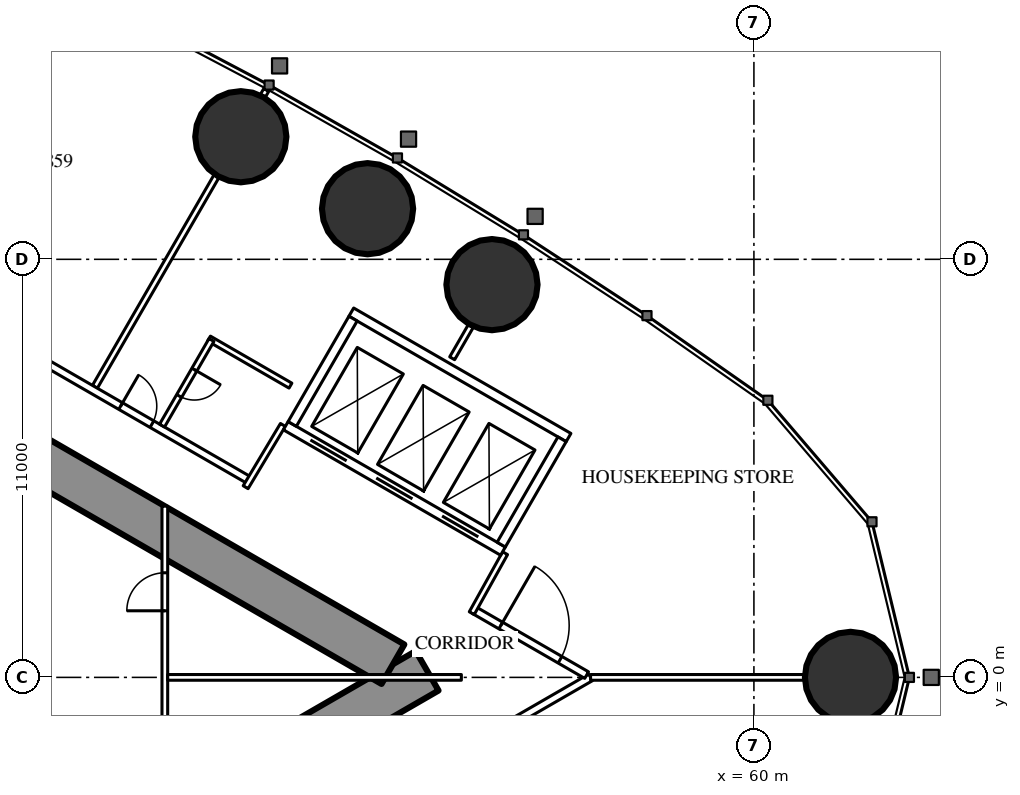
"""IFC4 building model, lengths in metres.
Left out: names, types, materials, properties, quantities, classifications, styles, units other than length and angle.
Written with IfcOpenShell. Run it as: python <this file> out.ifc"""

import sys

from ifc_helpers import new_model, si_unit, direction, frame, frame_2d, origin, origin_2d, place, context, subcontext, project, spatial, rectangle, circle, extrude, element, fill, save


model = new_model("IFC4")
c1 = context("Model", 3, precision=1e-05, world=origin(), true_north=direction((0.0, 1.0)))
c2 = subcontext(c1, "Body", "Model", "MODEL_VIEW")
j1 = project(units=[si_unit("LENGTHUNIT", "METRE"), si_unit("PLANEANGLEUNIT", "RADIAN")], contexts=[c1])
p1 = place(None, origin())
s1 = spatial("IfcSite", under=j1, at=p1, CompositionType="ELEMENT")
p2 = place(p1, origin())
s2 = spatial("IfcBuilding", under=s1, at=p2, CompositionType="ELEMENT")
p3 = place(p2, frame((0.0, 0.0, 218.9)))
s3 = spatial("IfcBuildingStorey", under=s2, at=p3, CompositionType="ELEMENT", Elevation=218.9)
for number, where, z_axis, x_axis in (
    (1, (62.542, 0.0, 0.0), (0.0, 0.0, 1.0), (1.0, 0.0, 0.0)),
    (2, (53.108, 10.334, 0.0), (0.0, 0.0, 1.0), (1.0, 0.0, 0.0)),
    (3, (49.834, 12.332, 0.0), (0.0, 0.0, 1.0), (1.0, 0.0, 0.0)),
    (4, (46.499, 14.226, 0.0), (0.0, 0.0, 1.0), (1.0, 0.0, 0.0)),
):
    element("IfcColumn", number, at=place(p3, frame(where, z_axis=z_axis, x_axis=x_axis)), inside=s3, PredefinedType="COLUMN", context=c2, shape_type="SweptSolid", body=[
        extrude(circle(Radius=1.2, at=origin_2d()), origin(), (0.0, 0.0, 1.0), 3.6),
    ])
p4 = place(p3, frame((27.2, -13.8, 0.0), z_axis=(0.0, 0.0, 1.0), x_axis=(0.866027159892, 0.499996958321, 0.0)))
e5 = element("IfcWall", 5, at=p4, inside=s3, PredefinedType="SHEAR", context=c2, shape_type="SweptSolid", body=[
    extrude(rectangle(XDim=27.947, YDim=1.2, at=frame_2d((13.973, 0.0))), origin(), (0.0, 0.0, 1.0), 3.6),
])
p5 = place(p4, frame((4.6, 0.0, 0.0)))
e6 = element("IfcOpeningElement", 6, at=p5, cuts=e5, PredefinedType="OPENING", context=c2, shape_type="SweptSolid", body=[
    extrude(rectangle(XDim=1.0, YDim=2.2, at=frame_2d((0.5, 1.1))), frame((0.0, 0.61, 0.0), z_axis=(0.0, -1.0, 0.0), x_axis=(1.0, 0.0, 0.0)), (0.0, 0.0, 1.0), 1.22),
])
p6 = place(p4, frame((13.395, 0.0, 0.0)))
e7 = element("IfcOpeningElement", 7, at=p6, cuts=e5, PredefinedType="OPENING", context=c2, shape_type="SweptSolid", body=[
    extrude(rectangle(XDim=1.8, YDim=2.2, at=frame_2d((0.9, 1.1))), frame((0.0, 0.61, 0.0), z_axis=(0.0, -1.0, 0.0), x_axis=(1.0, 0.0, 0.0)), (0.0, 0.0, 1.0), 1.22),
])
p7 = place(p3, frame((27.2, 13.8, 0.0), z_axis=(0.0, 0.0, 1.0), x_axis=(0.866024515034, -0.500001539357, 0.0)))
e8 = element("IfcWall", 8, at=p7, inside=s3, PredefinedType="SHEAR", context=c2, shape_type="SweptSolid", body=[
    extrude(rectangle(XDim=26.907, YDim=1.2, at=frame_2d((13.454, 0.0))), origin(), (0.0, 0.0, 1.0), 3.6),
])
p8 = place(p7, frame((4.6, 0.0, 0.0)))
e9 = element("IfcOpeningElement", 9, at=p8, cuts=e8, PredefinedType="OPENING", context=c2, shape_type="SweptSolid", body=[
    extrude(rectangle(XDim=1.0, YDim=2.2, at=frame_2d((0.5, 1.1))), frame((0.0, 0.61, 0.0), z_axis=(0.0, -1.0, 0.0), x_axis=(1.0, 0.0, 0.0)), (0.0, 0.0, 1.0), 1.22),
])
p9 = place(p7, frame((13.395, 0.0, 0.0)))
e10 = element("IfcOpeningElement", 10, at=p9, cuts=e8, PredefinedType="OPENING", context=c2, shape_type="SweptSolid", body=[
    extrude(rectangle(XDim=1.8, YDim=2.2, at=frame_2d((0.9, 1.1))), frame((0.0, 0.61, 0.0), z_axis=(0.0, -1.0, 0.0), x_axis=(1.0, 0.0, 0.0)), (0.0, 0.0, 1.0), 1.22),
])
p10 = place(p3, frame((28.959, -15.44, 0.0), z_axis=(0.0, 0.0, 1.0), x_axis=(0.866025227435, 0.500000305447, 0.0)))
e11 = element("IfcWall", 11, at=p10, inside=s3, PredefinedType="PARTITIONING", context=c2, shape_type="SweptSolid", body=[
    extrude(rectangle(XDim=30.88, YDim=0.2, at=frame_2d((15.44, 0.0))), origin(), (0.0, 0.0, 1.0), 3.35),
])
p11 = place(p10, frame((1.494, 0.0, 0.0)))
e12 = element("IfcOpeningElement", 12, at=p11, cuts=e11, PredefinedType="OPENING", context=c2, shape_type="SweptSolid", body=[
    extrude(rectangle(XDim=1.8, YDim=2.03, at=frame_2d((0.9, 1.015))), frame((0.0, 0.11, 0.0), z_axis=(0.0, -1.0, 0.0), x_axis=(1.0, 0.0, 0.0)), (0.0, 0.0, 1.0), 0.22),
])
p12 = place(p10, frame((7.687, 0.0, 0.0)))
e13 = element("IfcOpeningElement", 13, at=p12, cuts=e11, PredefinedType="OPENING", context=c2, shape_type="SweptSolid", body=[
    extrude(rectangle(XDim=1.0, YDim=2.2, at=frame_2d((0.5, 1.1))), frame((0.0, 0.11, 0.0), z_axis=(0.0, -1.0, 0.0), x_axis=(1.0, 0.0, 0.0)), (0.0, 0.0, 1.0), 0.22),
])
p13 = place(p10, frame((16.137, 0.0, 0.0)))
e14 = element("IfcOpeningElement", 14, at=p13, cuts=e11, PredefinedType="OPENING", context=c2, shape_type="SweptSolid", body=[
    extrude(rectangle(XDim=0.95, YDim=2.2, at=frame_2d((0.475, 1.1))), frame((0.0, 0.11, 0.0), z_axis=(0.0, -1.0, 0.0), x_axis=(1.0, 0.0, 0.0)), (0.0, 0.0, 1.0), 0.22),
])
p14 = place(p10, frame((20.021, 0.0, 0.0)))
e15 = element("IfcOpeningElement", 15, at=p14, cuts=e11, PredefinedType="OPENING", context=c2, shape_type="SweptSolid", body=[
    extrude(rectangle(XDim=0.95, YDim=2.2, at=frame_2d((0.475, 1.1))), frame((0.0, 0.11, 0.0), z_axis=(0.0, -1.0, 0.0), x_axis=(1.0, 0.0, 0.0)), (0.0, 0.0, 1.0), 0.22),
])
p15 = place(p10, frame((26.253, 0.0, 0.0)))
e16 = element("IfcOpeningElement", 16, at=p15, cuts=e11, PredefinedType="OPENING", context=c2, shape_type="SweptSolid", body=[
    extrude(rectangle(XDim=0.95, YDim=2.2, at=frame_2d((0.475, 1.1))), frame((0.0, 0.11, 0.0), z_axis=(0.0, -1.0, 0.0), x_axis=(1.0, 0.0, 0.0)), (0.0, 0.0, 1.0), 0.22),
])
p16 = place(p3, frame((42.66, 7.646, 0.0), z_axis=(0.0, 0.0, 1.0), x_axis=(0.499996592859, 0.866027370889, 0.0)))
e17 = element("IfcWall", 17, at=p16, inside=s3, PredefinedType="PARTITIONING", context=c2, shape_type="SweptSolid", body=[
    extrude(rectangle(XDim=6.398, YDim=0.15, at=frame_2d((3.199, 0.0))), origin(), (0.0, 0.0, 1.0), 2.45),
])
p17 = place(p3, frame((47.079, 15.3, 0.0), z_axis=(0.0, 0.0, 1.0), x_axis=(0.499212083968, 0.866479829667, 0.0)))
e18 = element("IfcWall", 18, at=p17, inside=s3, PredefinedType="PARTITIONING", context=c2, shape_type="SweptSolid", body=[
    extrude(rectangle(XDim=0.179, YDim=0.15, at=frame_2d((0.09, 0.0))), origin(), (0.0, 0.0, 1.0), 2.45),
])
p18 = place(p3, frame((55.702, 0.0, 0.0), z_axis=(0.0, 0.0, 1.0), x_axis=(1.0, 0.0, 0.0)))
e19 = element("IfcWall", 19, at=p18, inside=s3, PredefinedType="PARTITIONING", context=c2, shape_type="SweptSolid", body=[
    extrude(rectangle(XDim=5.619, YDim=0.15, at=frame_2d((2.81, 0.0))), origin(), (0.0, 0.0, 1.0), 2.45),
])
p19 = place(p3, frame((52.06, 8.396, 0.0), z_axis=(0.0, 0.0, 1.0), x_axis=(0.500095379624, 0.865970329329, 0.0)))
e20 = element("IfcWall", 20, at=p19, inside=s3, PredefinedType="PARTITIONING", context=c2, shape_type="SweptSolid", body=[
    extrude(rectangle(XDim=0.982, YDim=0.15, at=frame_2d((0.491, 0.0))), origin(), (0.0, 0.0, 1.0), 3.35),
])
p20 = place(p3, frame((28.959, 15.44, 0.0), z_axis=(0.0, 0.0, 1.0), x_axis=(0.866028936079, -0.499993881836, 0.0)))
e21 = element("IfcWall", 21, at=p20, inside=s3, PredefinedType="PARTITIONING", context=c2, shape_type="SweptSolid", body=[
    extrude(rectangle(XDim=20.503, YDim=0.2, at=frame_2d((10.251, 0.0))), origin(), (0.0, 0.0, 1.0), 3.35),
])
p21 = place(p20, frame((16.603, 0.0, 0.0)))
e22 = element("IfcOpeningElement", 22, at=p21, cuts=e21, PredefinedType="OPENING", context=c2, shape_type="SweptSolid", body=[
    extrude(rectangle(XDim=0.95, YDim=2.2, at=frame_2d((0.475, 1.1))), frame((0.0, 0.11, 0.0), z_axis=(0.0, -1.0, 0.0), x_axis=(1.0, 0.0, 0.0)), (0.0, 0.0, 1.0), 0.22),
])
p22 = place(p20, frame((7.287, 0.0, 0.0)))
e23 = element("IfcOpeningElement", 23, at=p22, cuts=e21, PredefinedType="OPENING", context=c2, shape_type="SweptSolid", body=[
    extrude(rectangle(XDim=0.95, YDim=2.2, at=frame_2d((0.475, 1.1))), frame((0.0, 0.11, 0.0), z_axis=(0.0, -1.0, 0.0), x_axis=(1.0, 0.0, 0.0)), (0.0, 0.0, 1.0), 0.22),
])
p23 = place(p20, frame((2.244, 0.0, 0.0)))
e24 = element("IfcOpeningElement", 24, at=p23, cuts=e21, PredefinedType="OPENING", context=c2, shape_type="SweptSolid", body=[
    extrude(rectangle(XDim=1.8, YDim=2.03, at=frame_2d((0.9, 1.015))), frame((0.0, 0.11, 0.0), z_axis=(0.0, -1.0, 0.0), x_axis=(1.0, 0.0, 0.0)), (0.0, 0.0, 1.0), 0.22),
])
p24 = place(p3, frame((52.639, 1.769, 0.0), z_axis=(0.0, 0.0, 1.0), x_axis=(0.866027340901, -0.4999966448, 0.0)))
e25 = element("IfcWall", 25, at=p24, inside=s3, PredefinedType="PARTITIONING", context=c2, shape_type="SweptSolid", body=[
    extrude(rectangle(XDim=3.417, YDim=0.2, at=frame_2d((1.708, 0.0))), origin(), (0.0, 0.0, 1.0), 3.35),
])
p25 = place(p24, frame((0.809, 0.0, 0.0)))
e26 = element("IfcOpeningElement", 26, at=p25, cuts=e25, PredefinedType="OPENING", context=c2, shape_type="SweptSolid", body=[
    extrude(rectangle(XDim=1.8, YDim=2.2, at=frame_2d((0.9, 1.1))), frame((0.0, 0.11, 0.0), z_axis=(0.0, -1.0, 0.0), x_axis=(1.0, 0.0, 0.0)), (0.0, 0.0, 1.0), 0.22),
])
p26 = place(p3, frame((47.606, 6.642, 0.0), z_axis=(0.0, 0.0, 1.0), x_axis=(-0.51353662755, -0.858067673418, 0.0)))
e27 = element("IfcWall", 27, at=p26, inside=s3, PredefinedType="PARTITIONING", context=c2, shape_type="SweptSolid", body=[
    extrude(rectangle(XDim=1.91, YDim=0.15, at=frame_2d((0.955, 0.0))), origin(), (0.0, 0.0, 1.0), 3.35),
])
p27 = place(p3, frame((52.576, 1.689, 0.0), z_axis=(0.0, 0.0, 1.0), x_axis=(0.485424724123, 0.874278466629, 0.0)))
e28 = element("IfcWall", 28, at=p27, inside=s3, PredefinedType="PARTITIONING", context=c2, shape_type="SweptSolid", body=[
    extrude(rectangle(XDim=1.805, YDim=0.15, at=frame_2d((0.903, 0.0))), origin(), (0.0, 0.0, 1.0), 3.35),
])
p28 = place(p3, frame((45.662, 8.914, 0.0), z_axis=(0.0, 0.0, 1.0), x_axis=(0.86604923931, -0.499958713387, 0.0)))
e29 = element("IfcWall", 29, at=p28, inside=s3, PredefinedType="PARTITIONING", context=c2, shape_type="SweptSolid", body=[
    extrude(rectangle(XDim=2.475, YDim=0.15, at=frame_2d((1.237, 0.0))), origin(), (0.0, 0.0, 1.0), 3.35),
])
p29 = place(p3, frame((44.427, 6.625, 0.0), z_axis=(0.0, 0.0, 1.0), x_axis=(0.500006934395, 0.866021400173, 0.0)))
e30 = element("IfcWall", 30, at=p29, inside=s3, PredefinedType="PARTITIONING", context=c2, shape_type="SweptSolid", body=[
    extrude(rectangle(XDim=2.6, YDim=0.15, at=frame_2d((1.3, 0.0))), origin(), (0.0, 0.0, 1.0), 3.35),
])
p30 = place(p29, frame((0.9, 0.0, 0.0)))
e31 = element("IfcOpeningElement", 31, at=p30, cuts=e30, PredefinedType="OPENING", context=c2, shape_type="SweptSolid", body=[
    extrude(rectangle(XDim=0.8, YDim=2.2, at=frame_2d((0.4, 1.1))), frame((0.0, 0.085, 0.0), z_axis=(0.0, -1.0, 0.0), x_axis=(1.0, 0.0, 0.0)), (0.0, 0.0, 1.0), 0.17),
])
p31 = place(p3, frame((44.5, -4.505, 0.0), z_axis=(0.0, 0.0, 1.0), x_axis=(0.0, 1.0, 0.0)))
e32 = element("IfcWall", 32, at=p31, inside=s3, PredefinedType="PARTITIONING", context=c2, shape_type="SweptSolid", body=[
    extrude(rectangle(XDim=9.009, YDim=0.15, at=frame_2d((4.505, 0.0))), origin(), (0.0, 0.0, 1.0), 3.35),
])
p32 = place(p31, frame((1.752, 0.0, 0.0)))
e33 = element("IfcOpeningElement", 33, at=p32, cuts=e32, PredefinedType="OPENING", context=c2, shape_type="SweptSolid", body=[
    extrude(rectangle(XDim=1.0, YDim=2.2, at=frame_2d((0.5, 1.1))), frame((0.0, 0.085, 0.0), z_axis=(0.0, -1.0, 0.0), x_axis=(1.0, 0.0, 0.0)), (0.0, 0.0, 1.0), 0.17),
])
p33 = place(p31, frame((6.257, 0.0, 0.0)))
e34 = element("IfcOpeningElement", 34, at=p33, cuts=e32, PredefinedType="OPENING", context=c2, shape_type="SweptSolid", body=[
    extrude(rectangle(XDim=1.0, YDim=2.2, at=frame_2d((0.5, 1.1))), frame((0.0, 0.085, 0.0), z_axis=(0.0, -1.0, 0.0), x_axis=(1.0, 0.0, 0.0)), (0.0, 0.0, 1.0), 0.17),
])
p34 = place(p3, frame((44.575, 0.0, 0.0), z_axis=(0.0, 0.0, 1.0), x_axis=(1.0, 0.0, 0.0)))
e35 = element("IfcWall", 35, at=p34, inside=s3, PredefinedType="PARTITIONING", context=c2, shape_type="SweptSolid", body=[
    extrude(rectangle(XDim=7.727, YDim=0.15, at=frame_2d((3.864, 0.0))), origin(), (0.0, 0.0, 1.0), 2.45),
])
p35 = place(p3, frame((47.681, 6.622, 0.0), z_axis=(0.0, 0.0, 1.0), x_axis=(0.86603344179, -0.499986077507, 0.0)))
e36 = element("IfcWall", 36, at=p35, inside=s3, PredefinedType="PARTITIONING", context=c2, shape_type="SweptSolid", body=[
    extrude(rectangle(XDim=6.6, YDim=0.25, at=frame_2d((3.3, 0.0))), origin(), (0.0, 0.0, 1.0), 3.35),
])
p36 = place(p35, frame((0.75, 0.0, 0.0)))
e37 = element("IfcOpeningElement", 37, at=p36, cuts=e36, PredefinedType="OPENING", context=c2, shape_type="SweptSolid", body=[
    extrude(rectangle(XDim=1.1, YDim=2.2, at=frame_2d((0.55, 1.1))), frame((0.0, 0.135, 0.0), z_axis=(0.0, -1.0, 0.0), x_axis=(1.0, 0.0, 0.0)), (0.0, 0.0, 1.0), 0.27),
])
p37 = place(p35, frame((2.75, 0.0, 0.0)))
e38 = element("IfcOpeningElement", 38, at=p37, cuts=e36, PredefinedType="OPENING", context=c2, shape_type="SweptSolid", body=[
    extrude(rectangle(XDim=1.1, YDim=2.2, at=frame_2d((0.55, 1.1))), frame((0.0, 0.135, 0.0), z_axis=(0.0, -1.0, 0.0), x_axis=(1.0, 0.0, 0.0)), (0.0, 0.0, 1.0), 0.27),
])
p38 = place(p35, frame((4.75, 0.0, 0.0)))
e39 = element("IfcOpeningElement", 39, at=p38, cuts=e36, PredefinedType="OPENING", context=c2, shape_type="SweptSolid", body=[
    extrude(rectangle(XDim=1.1, YDim=2.2, at=frame_2d((0.55, 1.1))), frame((0.0, 0.135, 0.0), z_axis=(0.0, -1.0, 0.0), x_axis=(1.0, 0.0, 0.0)), (0.0, 0.0, 1.0), 0.27),
])
p39 = place(p3, frame((49.406, 9.611, 0.0), z_axis=(0.0, 0.0, 1.0), x_axis=(0.86603344179, -0.499986077507, 0.0)))
e40 = element("IfcWall", 40, at=p39, inside=s3, PredefinedType="PARTITIONING", context=c2, shape_type="SweptSolid", body=[
    extrude(rectangle(XDim=6.6, YDim=0.25, at=frame_2d((3.3, 0.0))), origin(), (0.0, 0.0, 1.0), 3.35),
])
p40 = place(p3, frame((47.852, 6.668, 0.0), z_axis=(0.0, 0.0, 1.0), x_axis=(0.499929347863, 0.866066190972, 0.0)))
e41 = element("IfcWall", 41, at=p40, inside=s3, PredefinedType="PARTITIONING", context=c2, shape_type="SweptSolid", body=[
    extrude(rectangle(XDim=3.201, YDim=0.25, at=frame_2d((1.6, 0.0))), origin(), (0.0, 0.0, 1.0), 3.35),
])
p41 = place(p3, frame((53.352, 3.493, 0.0), z_axis=(0.0, 0.0, 1.0), x_axis=(0.499872130319, 0.866099216793, 0.0)))
e42 = element("IfcWall", 42, at=p41, inside=s3, PredefinedType="PARTITIONING", context=c2, shape_type="SweptSolid", body=[
    extrude(rectangle(XDim=3.2, YDim=0.25, at=frame_2d((1.6, 0.0))), origin(), (0.0, 0.0, 1.0), 3.35),
])
p42 = place(p30, origin())
e43 = element("IfcDoor", 43, at=p42, inside=s3, OperationType="SINGLE_SWING_RIGHT", PredefinedType="DOOR", context=c2, shape_type="SweptSolid", body=[
    extrude(rectangle(XDim=0.8, YDim=2.2, at=frame_2d((0.4, 1.1))), frame((0.0, 0.025, 0.0), z_axis=(0.0, -1.0, 0.0), x_axis=(1.0, 0.0, 0.0)), (0.0, 0.0, 1.0), 0.05),
])
fill(e31, e43)
p43 = place(p21, origin())
e44 = element("IfcDoor", 44, at=p43, inside=s3, OperationType="SINGLE_SWING_LEFT", PredefinedType="DOOR", context=c2, shape_type="SweptSolid", body=[
    extrude(rectangle(XDim=0.95, YDim=2.2, at=frame_2d((0.475, 1.1))), frame((0.0, 0.025, 0.0), z_axis=(0.0, -1.0, 0.0), x_axis=(1.0, 0.0, 0.0)), (0.0, 0.0, 1.0), 0.05),
])
fill(e22, e44)
p44 = place(p25, origin())
e45 = element("IfcDoor", 45, at=p44, inside=s3, OperationType="DOUBLE_DOOR_SINGLE_SWING", PredefinedType="DOOR", context=c2, shape_type="SweptSolid", body=[
    extrude(rectangle(XDim=1.8, YDim=2.2, at=frame_2d((0.9, 1.1))), frame((0.0, 0.025, 0.0), z_axis=(0.0, -1.0, 0.0), x_axis=(1.0, 0.0, 0.0)), (0.0, 0.0, 1.0), 0.05),
])
fill(e26, e45)
p45 = place(p33, origin())
e46 = element("IfcDoor", 46, at=p45, inside=s3, OperationType="SINGLE_SWING_LEFT", PredefinedType="DOOR", context=c2, shape_type="SweptSolid", body=[
    extrude(rectangle(XDim=1.0, YDim=2.2, at=frame_2d((0.5, 1.1))), frame((0.0, 0.025, 0.0), z_axis=(0.0, -1.0, 0.0), x_axis=(1.0, 0.0, 0.0)), (0.0, 0.0, 1.0), 0.05),
])
fill(e34, e46)
p46 = place(p36, origin())
e47 = element("IfcDoor", 47, at=p46, inside=s3, OperationType="DOUBLE_DOOR_SLIDING", PredefinedType="USERDEFINED", context=c2, shape_type="SweptSolid", body=[
    extrude(rectangle(XDim=1.1, YDim=2.2, at=frame_2d((0.55, 1.1))), frame((0.0, 0.025, 0.0), z_axis=(0.0, -1.0, 0.0), x_axis=(1.0, 0.0, 0.0)), (0.0, 0.0, 1.0), 0.05),
])
fill(e37, e47)
p47 = place(p37, origin())
e48 = element("IfcDoor", 48, at=p47, inside=s3, OperationType="DOUBLE_DOOR_SLIDING", PredefinedType="USERDEFINED", context=c2, shape_type="SweptSolid", body=[
    extrude(rectangle(XDim=1.1, YDim=2.2, at=frame_2d((0.55, 1.1))), frame((0.0, 0.025, 0.0), z_axis=(0.0, -1.0, 0.0), x_axis=(1.0, 0.0, 0.0)), (0.0, 0.0, 1.0), 0.05),
])
fill(e38, e48)
p48 = place(p38, origin())
e49 = element("IfcDoor", 49, at=p48, inside=s3, OperationType="DOUBLE_DOOR_SLIDING", PredefinedType="USERDEFINED", context=c2, shape_type="SweptSolid", body=[
    extrude(rectangle(XDim=1.1, YDim=2.2, at=frame_2d((0.55, 1.1))), frame((0.0, 0.025, 0.0), z_axis=(0.0, -1.0, 0.0), x_axis=(1.0, 0.0, 0.0)), (0.0, 0.0, 1.0), 0.05),
])
fill(e39, e49)
save(model, sys.argv[1])
